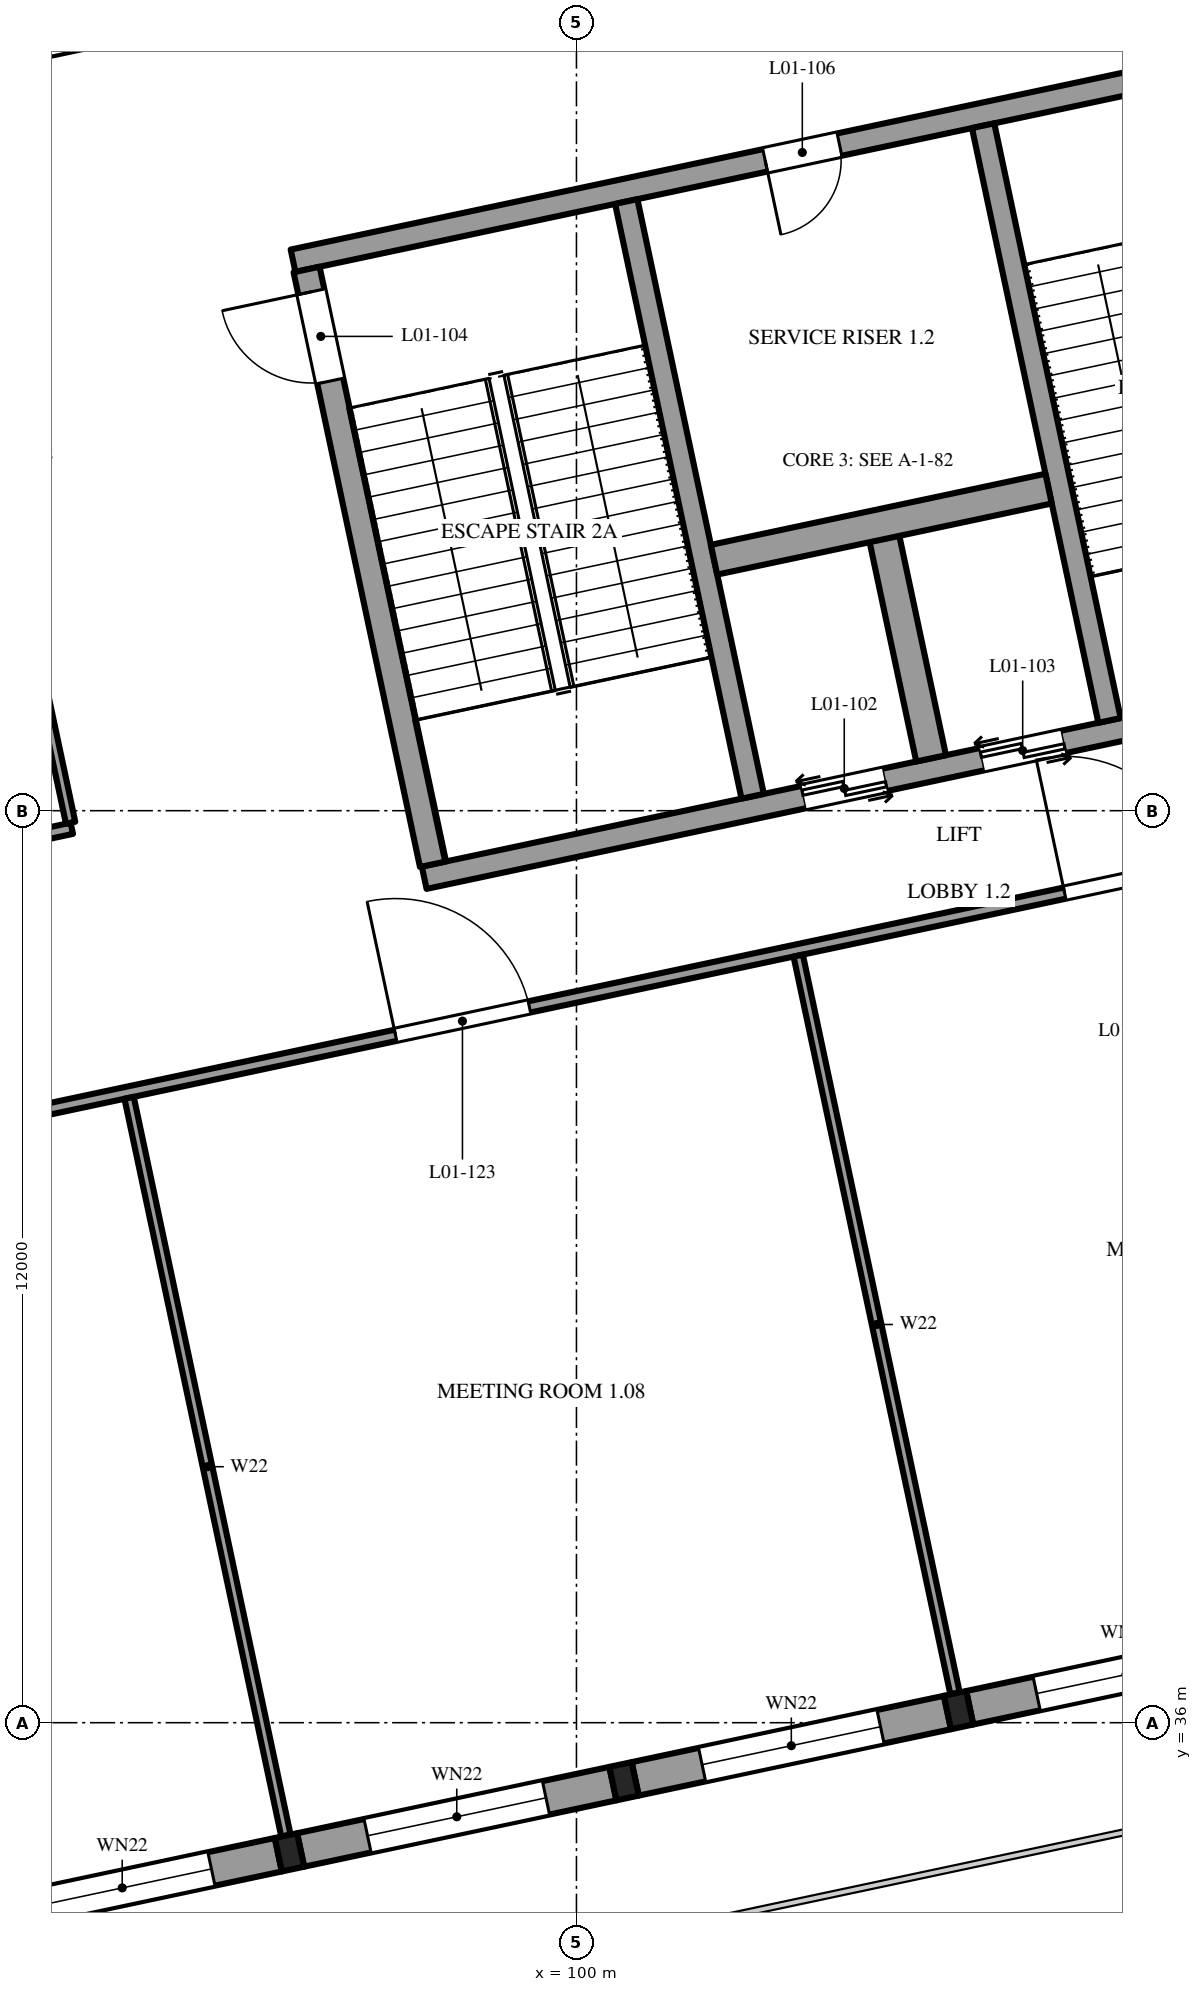
"""IFC4 building model, lengths in metres.
Left out: names, types, materials, properties, quantities, classifications, styles, units other than length and angle.
Written with IfcOpenShell. Run it as: python <this file> out.ifc"""

import sys

from ifc_helpers import new_model, si_unit, direction, frame, frame_2d, origin, origin_2d, place, context, subcontext, project, spatial, rectangle, i_section, extrude, element, fill, save


model = new_model("IFC4")
c1 = context("Model", 3, precision=1e-05, world=origin(), true_north=direction((0.0, 1.0)))
c2 = subcontext(c1, "Body", "Model", "MODEL_VIEW")
j1 = project(units=[si_unit("LENGTHUNIT", "METRE"), si_unit("PLANEANGLEUNIT", "RADIAN")], contexts=[c1])
p1 = place(None, origin())
s1 = spatial("IfcSite", under=j1, at=p1, CompositionType="ELEMENT")
p2 = place(p1, origin())
s2 = spatial("IfcBuilding", under=s1, at=p2, CompositionType="ELEMENT")
p3 = place(p2, frame((0.0, 0.0, 7.2)))
s3 = spatial("IfcBuildingStorey", under=s2, at=p3, CompositionType="ELEMENT", Elevation=7.2)
for number, where, z_axis, x_axis in (
    (1, (96.224, 34.294, 0.0), (0.0, 0.0, 1.0), (0.978, 0.208, 0.0)),
    (2, (100.626, 35.23, 0.0), (0.0, 0.0, 1.0), (0.978, 0.208, 0.0)),
    (3, (105.028, 36.165, 0.0), (0.0, 0.0, 1.0), (0.978, 0.208, 0.0)),
):
    element("IfcColumn", number, at=place(p3, frame(where, z_axis=z_axis, x_axis=x_axis)), inside=s3, PredefinedType="COLUMN", context=c2, shape_type="SweptSolid", body=[
        extrude(i_section(OverallWidth=0.3, OverallDepth=0.45, WebThickness=0.014, FlangeThickness=0.026, FilletRadius=0.027, at=origin_2d()), origin(), (0.0, 0.0, 1.0), 4.8),
    ])
p4 = place(p3, frame((96.271, 55.236, 0.0), z_axis=(0.0, 0.0, 1.0), x_axis=(0.978147662755, 0.20791139903, 0.0)))
e4 = element("IfcWall", 4, at=p4, inside=s3, PredefinedType="SHEAR", context=c2, shape_type="SweptSolid", body=[
    extrude(rectangle(XDim=13.7, YDim=0.3, at=frame_2d((6.85, 0.0))), origin(), (0.0, 0.0, 1.0), 4.8),
])
p5 = place(p4, frame((6.35, 0.0, 0.0)))
e5 = element("IfcOpeningElement", 5, at=p5, cuts=e4, PredefinedType="OPENING", context=c2, shape_type="SweptSolid", body=[
    extrude(rectangle(XDim=1.0, YDim=2.1, at=frame_2d((0.5, 1.05))), frame((0.0, 0.16, 0.0), z_axis=(0.0, -1.0, 0.0), x_axis=(1.0, 0.0, 0.0)), (0.0, 0.0, 1.0), 0.32),
])
p6 = place(p3, frame((97.997, 47.118, 0.0), z_axis=(0.0, 0.0, 1.0), x_axis=(0.978147662755, 0.20791139903, 0.0)))
e6 = element("IfcWall", 6, at=p6, inside=s3, PredefinedType="SHEAR", context=c2, shape_type="SweptSolid", body=[
    extrude(rectangle(XDim=13.7, YDim=0.3, at=frame_2d((6.85, 0.0))), origin(), (0.0, 0.0, 1.0), 4.8),
])
p7 = place(p6, frame((5.1, 0.0, 0.0)))
e7 = element("IfcOpeningElement", 7, at=p7, cuts=e6, PredefinedType="OPENING", context=c2, shape_type="SweptSolid", body=[
    extrude(rectangle(XDim=1.1, YDim=2.1, at=frame_2d((0.55, 1.05))), frame((0.0, 0.16, 0.0), z_axis=(0.0, -1.0, 0.0), x_axis=(1.0, 0.0, 0.0)), (0.0, 0.0, 1.0), 0.32),
])
p8 = place(p6, frame((7.5, 0.0, 0.0)))
e8 = element("IfcOpeningElement", 8, at=p8, cuts=e6, PredefinedType="OPENING", context=c2, shape_type="SweptSolid", body=[
    extrude(rectangle(XDim=1.1, YDim=2.1, at=frame_2d((0.55, 1.05))), frame((0.0, 0.16, 0.0), z_axis=(0.0, -1.0, 0.0), x_axis=(1.0, 0.0, 0.0)), (0.0, 0.0, 1.0), 0.32),
])
p9 = place(p3, frame((96.449, 55.121, 0.0), z_axis=(0.0, 0.0, 1.0), x_axis=(0.207915693476, -0.978146749934, 0.0)))
e9 = element("IfcWall", 9, at=p9, inside=s3, PredefinedType="SOLIDWALL", context=c2, shape_type="SweptSolid", body=[
    extrude(rectangle(XDim=8.0, YDim=0.35, at=frame_2d((4.0, 0.0))), origin(), (0.0, 0.0, 1.0), 4.8),
])
p10 = place(p9, frame((0.3, 0.0, 0.0)))
e10 = element("IfcOpeningElement", 10, at=p10, cuts=e9, PredefinedType="OPENING", context=c2, shape_type="SweptSolid", body=[
    extrude(rectangle(XDim=1.2, YDim=2.1, at=frame_2d((0.6, 1.05))), frame((0.0, 0.185, 0.0), z_axis=(0.0, -1.0, 0.0), x_axis=(1.0, 0.0, 0.0)), (0.0, 0.0, 1.0), 0.37),
])
for number, where, z_axis, x_axis in (
    (11, (100.655, 56.015, 0.0), (0.0, 0.0, 1.0), (0.208, -0.978, 0.0)),
    (12, (105.35, 57.013, 0.0), (0.0, 0.0, 1.0), (0.208, -0.978, 0.0)),
):
    element("IfcWall", number, at=place(p3, frame(where, z_axis=z_axis, x_axis=x_axis)), inside=s3, PredefinedType="SHEAR", context=c2, shape_type="SweptSolid", body=[
        extrude(rectangle(XDim=8.0, YDim=0.3, at=frame_2d((4.0, 0.0))), origin(), (0.0, 0.0, 1.0), 4.8),
    ])
p11 = place(p3, frame((104.042, 51.623, 0.0), z_axis=(0.0, 0.0, 1.0), x_axis=(0.207917150959, -0.978146440129, 0.0)))
e13 = element("IfcWall", 13, at=p11, inside=s3, PredefinedType="SHEAR", context=c2, shape_type="SweptSolid", body=[
    extrude(rectangle(XDim=3.0, YDim=0.4, at=frame_2d((1.5, 0.0))), origin(), (0.0, 0.0, 1.0), 4.8),
])
p12 = place(p3, frame((101.81, 51.302, 0.0), z_axis=(0.0, 0.0, 1.0), x_axis=(0.978138577198, 0.207954138688, 0.0)))
e14 = element("IfcWall", 14, at=p12, inside=s3, PredefinedType="SHEAR", context=c2, shape_type="SweptSolid", body=[
    extrude(rectangle(XDim=4.5, YDim=0.4, at=frame_2d((2.25, 0.0))), origin(), (0.0, 0.0, 1.0), 4.8),
])
p13 = place(p3, frame((91.969, 33.39, 0.0), z_axis=(0.0, 0.0, 1.0), x_axis=(0.978143927149, 0.207928972925, 0.0)))
e15 = element("IfcWall", 15, at=p13, inside=s3, PredefinedType="SOLIDWALL", context=c2, shape_type="SweptSolid", body=[
    extrude(rectangle(XDim=4.2, YDim=0.45, at=frame_2d((2.1, 0.0))), origin(), (0.0, 0.0, 1.0), 4.35),
])
p14 = place(p13, frame((0.9, 0.0, 0.9)))
e16 = element("IfcOpeningElement", 16, at=p14, cuts=e15, PredefinedType="OPENING", context=c2, shape_type="SweptSolid", body=[
    extrude(rectangle(XDim=2.4, YDim=2.4, at=frame_2d((1.2, 1.2))), frame((0.0, 0.235, 0.0), z_axis=(0.0, -1.0, 0.0), x_axis=(1.0, 0.0, 0.0)), (0.0, 0.0, 1.0), 0.47),
])
p15 = place(p3, frame((96.371, 34.325, 0.0), z_axis=(0.0, 0.0, 1.0), x_axis=(0.978143927149, 0.207928972925, 0.0)))
e17 = element("IfcWall", 17, at=p15, inside=s3, PredefinedType="SOLIDWALL", context=c2, shape_type="SweptSolid", body=[
    extrude(rectangle(XDim=4.2, YDim=0.45, at=frame_2d((2.1, 0.0))), origin(), (0.0, 0.0, 1.0), 4.35),
])
p16 = place(p15, frame((0.9, 0.0, 0.9)))
e18 = element("IfcOpeningElement", 18, at=p16, cuts=e17, PredefinedType="OPENING", context=c2, shape_type="SweptSolid", body=[
    extrude(rectangle(XDim=2.4, YDim=2.4, at=frame_2d((1.2, 1.2))), frame((0.0, 0.235, 0.0), z_axis=(0.0, -1.0, 0.0), x_axis=(1.0, 0.0, 0.0)), (0.0, 0.0, 1.0), 0.47),
])
p17 = place(p3, frame((100.773, 35.261, 0.0), z_axis=(0.0, 0.0, 1.0), x_axis=(0.978143927149, 0.207928972925, 0.0)))
e19 = element("IfcWall", 19, at=p17, inside=s3, PredefinedType="SOLIDWALL", context=c2, shape_type="SweptSolid", body=[
    extrude(rectangle(XDim=4.2, YDim=0.45, at=frame_2d((2.1, 0.0))), origin(), (0.0, 0.0, 1.0), 4.35),
])
p18 = place(p17, frame((0.9, 0.0, 0.9)))
e20 = element("IfcOpeningElement", 20, at=p18, cuts=e19, PredefinedType="OPENING", context=c2, shape_type="SweptSolid", body=[
    extrude(rectangle(XDim=2.4, YDim=2.4, at=frame_2d((1.2, 1.2))), frame((0.0, 0.235, 0.0), z_axis=(0.0, -1.0, 0.0), x_axis=(1.0, 0.0, 0.0)), (0.0, 0.0, 1.0), 0.47),
])
p19 = place(p3, frame((105.174, 36.197, 0.0), z_axis=(0.0, 0.0, 1.0), x_axis=(0.978155748334, 0.207873355681, 0.0)))
e21 = element("IfcWall", 21, at=p19, inside=s3, PredefinedType="SOLIDWALL", context=c2, shape_type="SweptSolid", body=[
    extrude(rectangle(XDim=4.2, YDim=0.45, at=frame_2d((2.1, 0.0))), origin(), (0.0, 0.0, 1.0), 4.35),
])
p20 = place(p19, frame((0.9, 0.0, 0.9)))
e22 = element("IfcOpeningElement", 22, at=p20, cuts=e21, PredefinedType="OPENING", context=c2, shape_type="SweptSolid", body=[
    extrude(rectangle(XDim=2.4, YDim=2.4, at=frame_2d((1.2, 1.2))), frame((0.0, 0.235, 0.0), z_axis=(0.0, -1.0, 0.0), x_axis=(1.0, 0.0, 0.0)), (0.0, 0.0, 1.0), 0.47),
])
p21 = place(p3, frame((91.381, 57.801, 0.0), z_axis=(0.0, 0.0, 1.0), x_axis=(0.978143927149, 0.207928972925, 0.0)))
e23 = element("IfcWall", 23, at=p21, inside=s3, PredefinedType="SOLIDWALL", context=c2, shape_type="SweptSolid", body=[
    extrude(rectangle(XDim=4.2, YDim=0.45, at=frame_2d((2.1, 0.0))), origin(), (0.0, 0.0, 1.0), 4.35),
])
p22 = place(p21, frame((0.9, 0.0, 0.45)))
e24 = element("IfcOpeningElement", 24, at=p22, cuts=e23, PredefinedType="OPENING", context=c2, shape_type="SweptSolid", body=[
    extrude(rectangle(XDim=2.4, YDim=3.3, at=frame_2d((1.2, 1.65))), frame((0.0, 0.235, 0.0), z_axis=(0.0, -1.0, 0.0), x_axis=(1.0, 0.0, 0.0)), (0.0, 0.0, 1.0), 0.47),
])
p23 = place(p3, frame((80.893, 41.489, 0.0), z_axis=(0.0, 0.0, 1.0), x_axis=(0.97814724207, 0.20791337819, 0.0)))
e25 = element("IfcWall", 25, at=p23, inside=s3, PredefinedType="PARTITIONING", context=c2, shape_type="SweptSolid", body=[
    extrude(rectangle(XDim=49.5, YDim=0.15, at=frame_2d((24.75, 0.0))), origin(), (0.0, 0.0, 1.0), 3.75),
])
p24 = place(p23, frame((5.85, 0.0, 0.0)))
e26 = element("IfcOpeningElement", 26, at=p24, cuts=e25, PredefinedType="OPENING", context=c2, shape_type="SweptSolid", body=[
    extrude(rectangle(XDim=1.8, YDim=2.1, at=frame_2d((0.9, 1.05))), frame((0.0, 0.085, 0.0), z_axis=(0.0, -1.0, 0.0), x_axis=(1.0, 0.0, 0.0)), (0.0, 0.0, 1.0), 0.17),
])
p25 = place(p23, frame((17.1, 0.0, 0.0)))
e27 = element("IfcOpeningElement", 27, at=p25, cuts=e25, PredefinedType="OPENING", context=c2, shape_type="SweptSolid", body=[
    extrude(rectangle(XDim=1.8, YDim=2.1, at=frame_2d((0.9, 1.05))), frame((0.0, 0.085, 0.0), z_axis=(0.0, -1.0, 0.0), x_axis=(1.0, 0.0, 0.0)), (0.0, 0.0, 1.0), 0.17),
])
p26 = place(p23, frame((26.1, 0.0, 0.0)))
e28 = element("IfcOpeningElement", 28, at=p26, cuts=e25, PredefinedType="OPENING", context=c2, shape_type="SweptSolid", body=[
    extrude(rectangle(XDim=1.8, YDim=2.1, at=frame_2d((0.9, 1.05))), frame((0.0, 0.085, 0.0), z_axis=(0.0, -1.0, 0.0), x_axis=(1.0, 0.0, 0.0)), (0.0, 0.0, 1.0), 0.17),
])
p27 = place(p23, frame((33.25, 0.0, 0.0)))
e29 = element("IfcOpeningElement", 29, at=p27, cuts=e25, PredefinedType="OPENING", context=c2, shape_type="SweptSolid", body=[
    extrude(rectangle(XDim=1.0, YDim=2.1, at=frame_2d((0.5, 1.05))), frame((0.0, 0.085, 0.0), z_axis=(0.0, -1.0, 0.0), x_axis=(1.0, 0.0, 0.0)), (0.0, 0.0, 1.0), 0.17),
])
p28 = place(p23, frame((41.7, 0.0, 0.0)))
e30 = element("IfcOpeningElement", 30, at=p28, cuts=e25, PredefinedType="OPENING", context=c2, shape_type="SweptSolid", body=[
    extrude(rectangle(XDim=2.1, YDim=2.4, at=frame_2d((1.05, 1.2))), frame((0.0, 0.085, 0.0), z_axis=(0.0, -1.0, 0.0), x_axis=(1.0, 0.0, 0.0)), (0.0, 0.0, 1.0), 0.17),
])
p29 = place(p3, frame((96.177, 34.514, 0.0), z_axis=(0.0, 0.0, 1.0), x_axis=(-0.20790935802, 0.978148096582, 0.0)))
e31 = element("IfcWall", 31, at=p29, inside=s3, PredefinedType="PARTITIONING", context=c2, shape_type="SweptSolid", body=[
    extrude(rectangle(XDim=9.925, YDim=0.125, at=frame_2d((4.962, 0.0))), origin(), (0.0, 0.0, 1.0), 3.75),
])
p30 = place(p3, frame((104.981, 36.385, 0.0), z_axis=(0.0, 0.0, 1.0), x_axis=(-0.207927890391, 0.978144157268, 0.0)))
e32 = element("IfcWall", 32, at=p30, inside=s3, PredefinedType="PARTITIONING", context=c2, shape_type="SweptSolid", body=[
    extrude(rectangle(XDim=9.925, YDim=0.125, at=frame_2d((4.963, 0.0))), origin(), (0.0, 0.0, 1.0), 3.75),
])
p31 = place(p3, frame((59.663, 40.605, 0.0), z_axis=(0.0, 0.0, 1.0), x_axis=(0.978147466509, 0.207912322295, 0.0)))
e33 = element("IfcWall", 33, at=p31, inside=s3, PredefinedType="PARTITIONING", context=c2, shape_type="SweptSolid", body=[
    extrude(rectangle(XDim=34.45, YDim=0.15, at=frame_2d((17.225, 0.0))), origin(), (0.0, 0.0, 1.0), 3.75),
])
p32 = place(p31, frame((2.975, 0.0, 0.0)))
e34 = element("IfcOpeningElement", 34, at=p32, cuts=e33, PredefinedType="OPENING", context=c2, shape_type="SweptSolid", body=[
    extrude(rectangle(XDim=1.5, YDim=2.1, at=frame_2d((0.75, 1.05))), frame((0.0, 0.085, 0.0), z_axis=(0.0, -1.0, 0.0), x_axis=(1.0, 0.0, 0.0)), (0.0, 0.0, 1.0), 0.17),
])
p33 = place(p31, frame((9.2, 0.0, 0.0)))
e35 = element("IfcOpeningElement", 35, at=p33, cuts=e33, PredefinedType="OPENING", context=c2, shape_type="SweptSolid", body=[
    extrude(rectangle(XDim=1.0, YDim=2.1, at=frame_2d((0.5, 1.05))), frame((0.0, 0.085, 0.0), z_axis=(0.0, -1.0, 0.0), x_axis=(1.0, 0.0, 0.0)), (0.0, 0.0, 1.0), 0.17),
])
p34 = place(p31, frame((13.7, 0.0, 0.0)))
e36 = element("IfcOpeningElement", 36, at=p34, cuts=e33, PredefinedType="OPENING", context=c2, shape_type="SweptSolid", body=[
    extrude(rectangle(XDim=1.0, YDim=2.1, at=frame_2d((0.5, 1.05))), frame((0.0, 0.085, 0.0), z_axis=(0.0, -1.0, 0.0), x_axis=(1.0, 0.0, 0.0)), (0.0, 0.0, 1.0), 0.17),
])
p35 = place(p31, frame((18.2, 0.0, 0.0)))
e37 = element("IfcOpeningElement", 37, at=p35, cuts=e33, PredefinedType="OPENING", context=c2, shape_type="SweptSolid", body=[
    extrude(rectangle(XDim=1.0, YDim=2.1, at=frame_2d((0.5, 1.05))), frame((0.0, 0.085, 0.0), z_axis=(0.0, -1.0, 0.0), x_axis=(1.0, 0.0, 0.0)), (0.0, 0.0, 1.0), 0.17),
])
p36 = place(p31, frame((24.55, 0.0, 0.0)))
e38 = element("IfcOpeningElement", 38, at=p36, cuts=e33, PredefinedType="OPENING", context=c2, shape_type="SweptSolid", body=[
    extrude(rectangle(XDim=1.8, YDim=2.1, at=frame_2d((0.9, 1.05))), frame((0.0, 0.085, 0.0), z_axis=(0.0, -1.0, 0.0), x_axis=(1.0, 0.0, 0.0)), (0.0, 0.0, 1.0), 0.17),
])
p37 = place(p31, frame((31.7, 0.0, 0.0)))
e39 = element("IfcOpeningElement", 39, at=p37, cuts=e33, PredefinedType="OPENING", context=c2, shape_type="SweptSolid", body=[
    extrude(rectangle(XDim=1.0, YDim=2.1, at=frame_2d((0.5, 1.05))), frame((0.0, 0.085, 0.0), z_axis=(0.0, -1.0, 0.0), x_axis=(1.0, 0.0, 0.0)), (0.0, 0.0, 1.0), 0.17),
])
p38 = place(p3, frame((91.281, 57.55, 0.0), z_axis=(0.0, 0.0, 1.0), x_axis=(0.207904355568, -0.978149159861, 0.0)))
e40 = element("IfcWall", 40, at=p38, inside=s3, PredefinedType="PARTITIONING", context=c2, shape_type="SweptSolid", body=[
    extrude(rectangle(XDim=9.925, YDim=0.125, at=frame_2d((4.962, 0.0))), origin(), (0.0, 0.0, 1.0), 3.75),
])
p39 = place(p14, origin())
e41 = element("IfcWindow", 41, at=p39, inside=s3, PartitioningType="SINGLE_PANEL", PredefinedType="WINDOW", context=c2, shape_type="SweptSolid", body=[
    extrude(rectangle(XDim=2.4, YDim=2.4, at=frame_2d((1.2, 1.2))), frame((0.0, 0.03, 0.0), z_axis=(0.0, -1.0, 0.0), x_axis=(1.0, 0.0, 0.0)), (0.0, 0.0, 1.0), 0.06),
])
fill(e16, e41)
p40 = place(p16, origin())
e42 = element("IfcWindow", 42, at=p40, inside=s3, PartitioningType="SINGLE_PANEL", PredefinedType="WINDOW", context=c2, shape_type="SweptSolid", body=[
    extrude(rectangle(XDim=2.4, YDim=2.4, at=frame_2d((1.2, 1.2))), frame((0.0, 0.03, 0.0), z_axis=(0.0, -1.0, 0.0), x_axis=(1.0, 0.0, 0.0)), (0.0, 0.0, 1.0), 0.06),
])
fill(e18, e42)
p41 = place(p18, origin())
e43 = element("IfcWindow", 43, at=p41, inside=s3, PartitioningType="SINGLE_PANEL", PredefinedType="WINDOW", context=c2, shape_type="SweptSolid", body=[
    extrude(rectangle(XDim=2.4, YDim=2.4, at=frame_2d((1.2, 1.2))), frame((0.0, 0.03, 0.0), z_axis=(0.0, -1.0, 0.0), x_axis=(1.0, 0.0, 0.0)), (0.0, 0.0, 1.0), 0.06),
])
fill(e20, e43)
p42 = place(p20, origin())
e44 = element("IfcWindow", 44, at=p42, inside=s3, PartitioningType="SINGLE_PANEL", PredefinedType="WINDOW", context=c2, shape_type="SweptSolid", body=[
    extrude(rectangle(XDim=2.4, YDim=2.4, at=frame_2d((1.2, 1.2))), frame((0.0, 0.03, 0.0), z_axis=(0.0, -1.0, 0.0), x_axis=(1.0, 0.0, 0.0)), (0.0, 0.0, 1.0), 0.06),
])
fill(e22, e44)
p43 = place(p22, origin())
e45 = element("IfcWindow", 45, at=p43, inside=s3, PartitioningType="DOUBLE_PANEL_VERTICAL", PredefinedType="WINDOW", context=c2, shape_type="SweptSolid", body=[
    extrude(rectangle(XDim=2.4, YDim=3.3, at=frame_2d((1.2, 1.65))), frame((0.0, 0.03, 0.0), z_axis=(0.0, -1.0, 0.0), x_axis=(1.0, 0.0, 0.0)), (0.0, 0.0, 1.0), 0.06),
])
fill(e24, e45)
p44 = place(p7, frame((1.1, 0.0, 0.0), z_axis=(0.0, 0.0, 1.0), x_axis=(-1.0, 0.0, 0.0)))
e46 = element("IfcDoor", 46, at=p44, inside=s3, OperationType="DOUBLE_DOOR_SLIDING", PredefinedType="DOOR", context=c2, shape_type="SweptSolid", body=[
    extrude(rectangle(XDim=1.1, YDim=2.1, at=frame_2d((0.55, 1.05))), frame((0.0, 0.025, 0.0), z_axis=(0.0, -1.0, 0.0), x_axis=(1.0, 0.0, 0.0)), (0.0, 0.0, 1.0), 0.05),
])
fill(e7, e46)
p45 = place(p8, frame((1.1, 0.0, 0.0), z_axis=(0.0, 0.0, 1.0), x_axis=(-1.0, 0.0, 0.0)))
e47 = element("IfcDoor", 47, at=p45, inside=s3, OperationType="DOUBLE_DOOR_SLIDING", PredefinedType="DOOR", context=c2, shape_type="SweptSolid", body=[
    extrude(rectangle(XDim=1.1, YDim=2.1, at=frame_2d((0.55, 1.05))), frame((0.0, 0.025, 0.0), z_axis=(0.0, -1.0, 0.0), x_axis=(1.0, 0.0, 0.0)), (0.0, 0.0, 1.0), 0.05),
])
fill(e8, e47)
p46 = place(p10, frame((1.2, 0.0, 0.0), z_axis=(0.0, 0.0, 1.0), x_axis=(-1.0, 0.0, 0.0)))
e48 = element("IfcDoor", 48, at=p46, inside=s3, OperationType="SINGLE_SWING_RIGHT", PredefinedType="DOOR", context=c2, shape_type="SweptSolid", body=[
    extrude(rectangle(XDim=1.2, YDim=2.1, at=frame_2d((0.6, 1.05))), frame((0.0, 0.025, 0.0), z_axis=(0.0, -1.0, 0.0), x_axis=(1.0, 0.0, 0.0)), (0.0, 0.0, 1.0), 0.05),
])
fill(e10, e48)
p47 = place(p5, frame((1.0, 0.0, 0.0), z_axis=(0.0, 0.0, 1.0), x_axis=(-1.0, 0.0, 0.0)))
e49 = element("IfcDoor", 49, at=p47, inside=s3, OperationType="SINGLE_SWING_LEFT", PredefinedType="DOOR", context=c2, shape_type="SweptSolid", body=[
    extrude(rectangle(XDim=1.0, YDim=2.1, at=frame_2d((0.5, 1.05))), frame((0.0, 0.025, 0.0), z_axis=(0.0, -1.0, 0.0), x_axis=(1.0, 0.0, 0.0)), (0.0, 0.0, 1.0), 0.05),
])
fill(e5, e49)
p48 = place(p25, origin())
e50 = element("IfcDoor", 50, at=p48, inside=s3, OperationType="DOUBLE_DOOR_SINGLE_SWING", PredefinedType="DOOR", context=c2, shape_type="SweptSolid", body=[
    extrude(rectangle(XDim=1.8, YDim=2.1, at=frame_2d((0.9, 1.05))), frame((0.0, 0.025, 0.0), z_axis=(0.0, -1.0, 0.0), x_axis=(1.0, 0.0, 0.0)), (0.0, 0.0, 1.0), 0.05),
])
fill(e27, e50)
p49 = place(p26, origin())
e51 = element("IfcDoor", 51, at=p49, inside=s3, OperationType="DOUBLE_DOOR_SINGLE_SWING", PredefinedType="DOOR", context=c2, shape_type="SweptSolid", body=[
    extrude(rectangle(XDim=1.8, YDim=2.1, at=frame_2d((0.9, 1.05))), frame((0.0, 0.025, 0.0), z_axis=(0.0, -1.0, 0.0), x_axis=(1.0, 0.0, 0.0)), (0.0, 0.0, 1.0), 0.05),
])
fill(e28, e51)
save(model, sys.argv[1])
